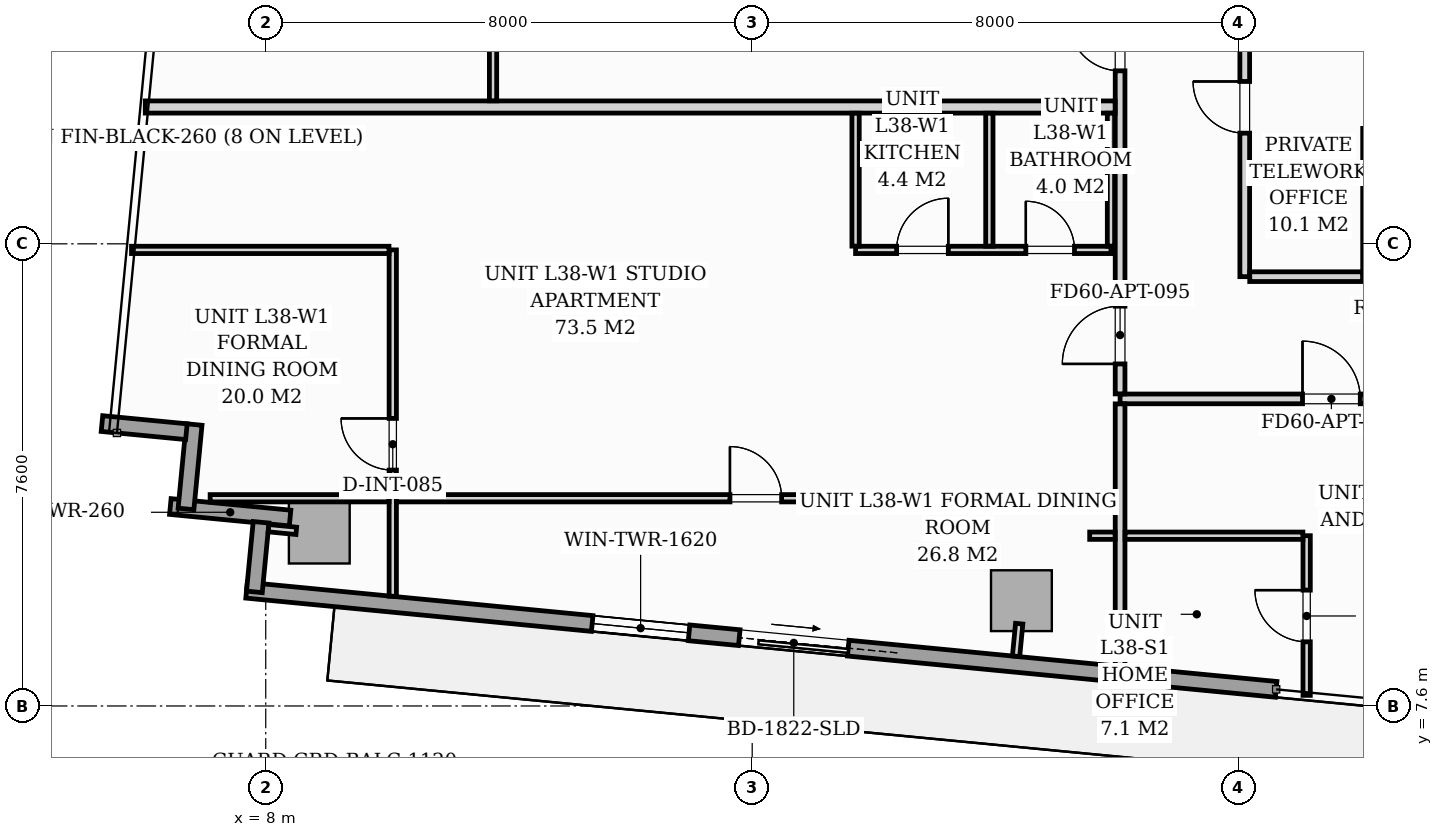
"""IFC4 building model, lengths in metres.
Left out: names, types, materials, properties, quantities, classifications, styles, units other than length and angle.
Written with IfcOpenShell. Run it as: python <this file> out.ifc"""

import sys

from ifc_helpers import new_model, si_unit, direction, frame, frame_2d, origin, origin_2d, place, context, subcontext, project, spatial, rectangle, extrude, source, transform, mapped, element, fill, save


model = new_model("IFC4")
c1 = context("Model", 3, precision=1e-05, world=origin(), true_north=direction((0.0, 1.0)))
c2 = subcontext(c1, "Body", "Model", "MODEL_VIEW")
j1 = project(units=[si_unit("LENGTHUNIT", "METRE"), si_unit("PLANEANGLEUNIT", "RADIAN")], contexts=[c1])
p1 = place(None, origin())
s1 = spatial("IfcSite", under=j1, at=p1, CompositionType="ELEMENT")
p2 = place(p1, origin())
s2 = spatial("IfcBuilding", under=s1, at=p2, CompositionType="ELEMENT")
p3 = place(p2, frame((0.0, 0.0, 134.2)))
s3 = spatial("IfcBuildingStorey", under=s2, at=p3, CompositionType="ELEMENT", Elevation=134.2)
m1 = source(origin(), c2, "Body", "SweptSolid", [
    extrude(rectangle(XDim=1.0, YDim=1.0, at=origin_2d()), origin(), (0.0, 0.0, 1.0), 3.196),
])
for number, where, z_axis, x_axis in (
    (1, (8.881, 10.443, 0.002), (0.0, 0.0, 1.0), (0.995, -0.096, 0.0)),
    (2, (20.427, 9.332, 0.002), (0.0, 0.0, 1.0), (0.995, -0.096, 0.0)),
):
    element("IfcColumn", number, at=place(p3, frame(where, z_axis=z_axis, x_axis=x_axis)), inside=s3, PredefinedType="COLUMN", context=c2, shape_type="MappedRepresentation", body=[
        mapped(m1, transform((0.0, 0.0, 0.0), scale=1.0)),
    ])
p4 = place(p3, frame((8.4, 10.69, 0.0), z_axis=(0.0, 0.0, 1.0), x_axis=(-0.995391147587, 0.095898192396, 0.0)))
e3 = element("IfcWall", 3, at=p4, inside=s3, PredefinedType="STANDARD", context=c2, shape_type="SweptSolid", body=[
    extrude(rectangle(XDim=1.978, YDim=0.26, at=frame_2d((0.989, 0.0))), origin(), (0.0, 0.0, 1.0), 2.94),
])
p5 = place(p3, frame((6.688, 10.84, 0.0), z_axis=(0.0, 0.0, 1.0), x_axis=(0.09589913835, 0.995391056452, 0.0)))
e4 = element("IfcWall", 4, at=p5, inside=s3, PredefinedType="STANDARD", context=c2, shape_type="SweptSolid", body=[
    extrude(rectangle(XDim=1.395, YDim=0.26, at=frame_2d((0.698, 0.0))), origin(), (0.0, 0.0, 1.0), 2.94),
])
p6 = place(p3, frame((6.695, 12.111, 0.0), z_axis=(0.0, 0.0, 1.0), x_axis=(-0.99540614245, 0.095742423056, 0.0)))
e5 = element("IfcWall", 5, at=p6, inside=s3, PredefinedType="STANDARD", context=c2, shape_type="SweptSolid", body=[
    extrude(rectangle(XDim=1.395, YDim=0.26, at=frame_2d((0.697, 0.0))), origin(), (0.0, 0.0, 1.0), 2.94),
])
p7 = place(p3, frame((24.617, 7.873, 0.0), z_axis=(0.0, 0.0, 1.0), x_axis=(-0.995395976631, 0.095848055311, 0.0)))
e6 = element("IfcWall", 6, at=p7, inside=s3, PredefinedType="STANDARD", context=c2, shape_type="SweptSolid", body=[
    extrude(rectangle(XDim=17.01, YDim=0.26, at=frame_2d((8.505, 0.0))), origin(), (0.0, 0.0, 1.0), 2.94),
])
p8 = place(p7, frame((7.07, 0.0, 0.0)))
e7 = element("IfcOpeningElement", 7, at=p8, cuts=e6, PredefinedType="OPENING", context=c2, shape_type="SweptSolid", body=[
    extrude(rectangle(XDim=1.8, YDim=2.06, at=frame_2d((0.9, 1.03))), frame((0.0, 0.14, 0.0), z_axis=(0.0, -1.0, 0.0), x_axis=(1.0, 0.0, 0.0)), (0.0, 0.0, 1.0), 0.28),
])
p9 = place(p7, frame((9.7, 0.0, 0.65)))
e8 = element("IfcOpeningElement", 8, at=p9, cuts=e6, PredefinedType="OPENING", context=c2, shape_type="SweptSolid", body=[
    extrude(rectangle(XDim=1.6, YDim=1.5, at=frame_2d((0.8, 0.75))), frame((0.0, 0.14, 0.0), z_axis=(0.0, -1.0, 0.0), x_axis=(1.0, 0.0, 0.0)), (0.0, 0.0, 1.0), 0.28),
])
p10 = place(p3, frame((7.813, 9.476, 0.0), z_axis=(0.0, 0.0, 1.0), x_axis=(0.09576095695, 0.995404359607, 0.0)))
e9 = element("IfcWall", 9, at=p10, inside=s3, PredefinedType="STANDARD", context=c2, shape_type="SweptSolid", body=[
    extrude(rectangle(XDim=1.15, YDim=0.26, at=frame_2d((0.575, 0.0))), origin(), (0.0, 0.0, 1.0), 2.94),
])
p11 = place(p3, frame((22.05, 12.65, 0.0), z_axis=(0.0, 0.0, 1.0), x_axis=(1.0, 0.0, 0.0)))
e10 = element("IfcWall", 10, at=p11, inside=s3, PredefinedType="PARTITIONING", context=c2, shape_type="SweptSolid", body=[
    extrude(rectangle(XDim=23.83, YDim=0.16, at=frame_2d((11.915, 0.0))), origin(), (0.0, 0.0, 1.0), 2.94),
])
p12 = place(p11, frame((3.0, 0.0, 0.0)))
e11 = element("IfcOpeningElement", 11, at=p12, cuts=e10, PredefinedType="OPENING", context=c2, shape_type="SweptSolid", body=[
    extrude(rectangle(XDim=0.95, YDim=2.06, at=frame_2d((0.475, 1.03))), frame((0.0, 0.09, 0.0), z_axis=(0.0, -1.0, 0.0), x_axis=(1.0, 0.0, 0.0)), (0.0, 0.0, 1.0), 0.18),
])
p13 = place(p11, frame((15.485, 0.0, 0.0)))
e12 = element("IfcOpeningElement", 12, at=p13, cuts=e10, PredefinedType="OPENING", context=c2, shape_type="SweptSolid", body=[
    extrude(rectangle(XDim=0.95, YDim=2.06, at=frame_2d((0.475, 1.03))), frame((0.0, 0.09, 0.0), z_axis=(0.0, -1.0, 0.0), x_axis=(1.0, 0.0, 0.0)), (0.0, 0.0, 1.0), 0.18),
])
p14 = place(p3, frame((22.05, 8.253, 0.0), z_axis=(0.0, 0.0, 1.0), x_axis=(0.0, 1.0, 0.0)))
e13 = element("IfcWall", 13, at=p14, inside=s3, PredefinedType="PARTITIONING", context=c2, shape_type="SweptSolid", body=[
    extrude(rectangle(XDim=4.315, YDim=0.16, at=frame_2d((2.157, 0.0))), origin(), (0.0, 0.0, 1.0), 2.94),
])
p15 = place(p3, frame((22.05, 12.732, 0.0), z_axis=(0.0, 0.0, 1.0), x_axis=(0.0, 1.0, 0.0)))
e14 = element("IfcWall", 14, at=p15, inside=s3, PredefinedType="PARTITIONING", context=c2, shape_type="SweptSolid", body=[
    extrude(rectangle(XDim=14.685, YDim=0.16, at=frame_2d((7.343, 0.0))), origin(), (0.0, 0.0, 1.0), 2.94),
])
p16 = place(p15, frame((0.493, 0.0, 0.0)))
e15 = element("IfcOpeningElement", 15, at=p16, cuts=e14, PredefinedType="OPENING", context=c2, shape_type="SweptSolid", body=[
    extrude(rectangle(XDim=0.95, YDim=2.06, at=frame_2d((0.475, 1.03))), frame((0.0, 0.09, 0.0), z_axis=(0.0, -1.0, 0.0), x_axis=(1.0, 0.0, 0.0)), (0.0, 0.0, 1.0), 0.18),
])
p17 = place(p15, frame((5.313, 0.0, 0.0)))
e16 = element("IfcOpeningElement", 16, at=p17, cuts=e14, PredefinedType="OPENING", context=c2, shape_type="SweptSolid", body=[
    extrude(rectangle(XDim=0.85, YDim=2.0, at=frame_2d((0.425, 1.0))), frame((0.0, 0.09, 0.0), z_axis=(0.0, -1.0, 0.0), x_axis=(1.0, 0.0, 0.0)), (0.0, 0.0, 1.0), 0.18),
])
p18 = place(p3, frame((25.118, 7.775, 0.0), z_axis=(0.0, 0.0, 1.0), x_axis=(0.0, 1.0, 0.0)))
e17 = element("IfcWall", 17, at=p18, inside=s3, PredefinedType="PARTITIONING", context=c2, shape_type="SweptSolid", body=[
    extrude(rectangle(XDim=2.625, YDim=0.12, at=frame_2d((1.312, 0.0))), origin(), (0.0, 0.0, 1.0), 2.94),
])
p19 = place(p18, frame((0.88, 0.0, 0.0)))
e18 = element("IfcOpeningElement", 18, at=p19, cuts=e17, PredefinedType="OPENING", context=c2, shape_type="SweptSolid", body=[
    extrude(rectangle(XDim=0.85, YDim=2.05, at=frame_2d((0.425, 1.025))), frame((0.0, 0.07, 0.0), z_axis=(0.0, -1.0, 0.0), x_axis=(1.0, 0.0, 0.0)), (0.0, 0.0, 1.0), 0.14),
])
p20 = place(p3, frame((21.55, 10.4, 0.0), z_axis=(0.0, 0.0, 1.0), x_axis=(1.0, 0.0, 0.0)))
e19 = element("IfcWall", 19, at=p20, inside=s3, PredefinedType="PARTITIONING", context=c2, shape_type="SweptSolid", body=[
    extrude(rectangle(XDim=0.418, YDim=0.12, at=frame_2d((0.209, 0.0))), origin(), (0.0, 0.0, 1.0), 2.94),
])
p21 = place(p3, frame((22.132, 10.4, 0.0), z_axis=(0.0, 0.0, 1.0), x_axis=(1.0, 0.0, 0.0)))
e20 = element("IfcWall", 20, at=p21, inside=s3, PredefinedType="PARTITIONING", context=c2, shape_type="SweptSolid", body=[
    extrude(rectangle(XDim=2.924, YDim=0.12, at=frame_2d((1.462, 0.0))), origin(), (0.0, 0.0, 1.0), 2.94),
])
p22 = place(p3, frame((6.019, 17.45, 0.0), z_axis=(0.0, 0.0, 1.0), x_axis=(1.0, 0.0, 0.0)))
e21 = element("IfcWall", 21, at=p22, inside=s3, PredefinedType="PARTITIONING", context=c2, shape_type="SweptSolid", body=[
    extrude(rectangle(XDim=15.949, YDim=0.2, at=frame_2d((7.975, 0.0))), origin(), (0.0, 0.0, 1.0), 2.94),
])
p23 = place(p3, frame((17.7, 15.1, 0.0), z_axis=(0.0, 0.0, 1.0), x_axis=(1.0, 0.0, 0.0)))
e22 = element("IfcWall", 22, at=p23, inside=s3, PredefinedType="PARTITIONING", context=c2, shape_type="SweptSolid", body=[
    extrude(rectangle(XDim=4.2, YDim=0.12, at=frame_2d((2.1, 0.0))), origin(), (0.0, 0.0, 1.0), 2.94),
])
p24 = place(p23, frame((0.675, 0.0, 0.0)))
e23 = element("IfcOpeningElement", 23, at=p24, cuts=e22, PredefinedType="OPENING", context=c2, shape_type="SweptSolid", body=[
    extrude(rectangle(XDim=0.85, YDim=2.05, at=frame_2d((0.425, 1.025))), frame((0.0, 0.07, 0.0), z_axis=(0.0, -1.0, 0.0), x_axis=(1.0, 0.0, 0.0)), (0.0, 0.0, 1.0), 0.14),
])
p25 = place(p23, frame((2.8, 0.0, 0.0)))
e24 = element("IfcOpeningElement", 24, at=p25, cuts=e22, PredefinedType="OPENING", context=c2, shape_type="SweptSolid", body=[
    extrude(rectangle(XDim=0.8, YDim=2.02, at=frame_2d((0.4, 1.01))), frame((0.0, 0.07, 0.0), z_axis=(0.0, -1.0, 0.0), x_axis=(1.0, 0.0, 0.0)), (0.0, 0.0, 1.0), 0.14),
])
for number, where, z_axis, x_axis in (
    (25, (17.7, 15.162, 0.0), (0.0, 0.0, 1.0), (0.0, 1.0, 0.0)),
    (26, (19.9, 15.162, 0.0), (0.0, 0.0, 1.0), (0.0, 1.0, 0.0)),
    (27, (21.9, 15.162, 0.0), (0.0, 0.0, 1.0), (0.0, 1.0, 0.0)),
):
    element("IfcWall", number, at=place(p3, frame(where, z_axis=z_axis, x_axis=x_axis)), inside=s3, PredefinedType="PARTITIONING", context=c2, shape_type="SweptSolid", body=[
        extrude(rectangle(XDim=2.186, YDim=0.12, at=frame_2d((1.093, 0.0))), origin(), (0.0, 0.0, 1.0), 2.94),
    ])
p26 = place(p3, frame((10.089, 9.405, 0.0), z_axis=(0.0, 0.0, 1.0), x_axis=(0.0, 1.0, 0.0)))
e28 = element("IfcWall", 28, at=p26, inside=s3, PredefinedType="PARTITIONING", context=c2, shape_type="SweptSolid", body=[
    extrude(rectangle(XDim=5.695, YDim=0.12, at=frame_2d((2.848, 0.0))), origin(), (0.0, 0.0, 1.0), 2.94),
])
p27 = place(p26, frame((2.074, 0.0, 0.0)))
e29 = element("IfcOpeningElement", 29, at=p27, cuts=e28, PredefinedType="OPENING", context=c2, shape_type="SweptSolid", body=[
    extrude(rectangle(XDim=0.85, YDim=2.05, at=frame_2d((0.425, 1.025))), frame((0.0, 0.07, 0.0), z_axis=(0.0, -1.0, 0.0), x_axis=(1.0, 0.0, 0.0)), (0.0, 0.0, 1.0), 0.14),
])
p28 = place(p3, frame((5.793, 15.1, 0.0), z_axis=(0.0, 0.0, 1.0), x_axis=(1.0, 0.0, 0.0)))
e30 = element("IfcWall", 30, at=p28, inside=s3, PredefinedType="PARTITIONING", context=c2, shape_type="SweptSolid", body=[
    extrude(rectangle(XDim=4.234, YDim=0.12, at=frame_2d((2.117, 0.0))), origin(), (0.0, 0.0, 1.0), 2.94),
])
p29 = place(p3, frame((7.086, 11.016, 0.0), z_axis=(0.0, 0.0, 1.0), x_axis=(1.0, 0.0, 0.0)))
e31 = element("IfcWall", 31, at=p29, inside=s3, PredefinedType="PARTITIONING", context=c2, shape_type="SweptSolid", body=[
    extrude(rectangle(XDim=2.941, YDim=0.12, at=frame_2d((1.471, 0.0))), origin(), (0.0, 0.0, 1.0), 2.94),
])
p30 = place(p3, frame((10.151, 11.016, 0.0), z_axis=(0.0, 0.0, 1.0), x_axis=(1.0, 0.0, 0.0)))
e32 = element("IfcWall", 32, at=p30, inside=s3, PredefinedType="PARTITIONING", context=c2, shape_type="SweptSolid", body=[
    extrude(rectangle(XDim=11.817, YDim=0.12, at=frame_2d((5.909, 0.0))), origin(), (0.0, 0.0, 1.0), 2.94),
])
p31 = place(p30, frame((5.483, 0.0, 0.0)))
e33 = element("IfcOpeningElement", 33, at=p31, cuts=e32, PredefinedType="OPENING", context=c2, shape_type="SweptSolid", body=[
    extrude(rectangle(XDim=0.85, YDim=2.05, at=frame_2d((0.425, 1.025))), frame((0.0, 0.07, 0.0), z_axis=(0.0, -1.0, 0.0), x_axis=(1.0, 0.0, 0.0)), (0.0, 0.0, 1.0), 0.14),
])
p32 = place(p3, frame((11.738, 17.552, 0.0), z_axis=(0.0, 0.0, 1.0), x_axis=(0.0, 1.0, 0.0)))
e34 = element("IfcWall", 34, at=p32, inside=s3, PredefinedType="PARTITIONING", context=c2, shape_type="SweptSolid", body=[
    extrude(rectangle(XDim=7.654, YDim=0.12, at=frame_2d((3.827, 0.0))), origin(), (0.0, 0.0, 1.0), 2.94),
])
p33 = place(p32, frame((3.402, 0.0, 0.0)))
e35 = element("IfcOpeningElement", 35, at=p33, cuts=e34, PredefinedType="OPENING", context=c2, shape_type="SweptSolid", body=[
    extrude(rectangle(XDim=0.85, YDim=2.05, at=frame_2d((0.425, 1.025))), frame((0.0, 0.07, 0.0), z_axis=(0.0, -1.0, 0.0), x_axis=(1.0, 0.0, 0.0)), (0.0, 0.0, 1.0), 0.14),
])
p34 = place(p3, frame((24.1, 14.66, 0.0), z_axis=(0.0, 0.0, 1.0), x_axis=(0.0, 1.0, 0.0)))
e36 = element("IfcWall", 36, at=p34, inside=s3, PredefinedType="PARTITIONING", context=c2, shape_type="SweptSolid", body=[
    extrude(rectangle(XDim=5.59, YDim=0.16, at=frame_2d((2.795, 0.0))), origin(), (0.0, 0.0, 1.0), 2.94),
])
p35 = place(p34, frame((2.36, 0.0, 0.0)))
e37 = element("IfcOpeningElement", 37, at=p35, cuts=e36, PredefinedType="OPENING", context=c2, shape_type="SweptSolid", body=[
    extrude(rectangle(XDim=0.85, YDim=2.0, at=frame_2d((0.425, 1.0))), frame((0.0, 0.09, 0.0), z_axis=(0.0, -1.0, 0.0), x_axis=(1.0, 0.0, 0.0)), (0.0, 0.0, 1.0), 0.18),
])
p36 = place(p3, frame((26.12, 14.66, 0.0), z_axis=(0.0, 0.0, 1.0), x_axis=(0.0, 1.0, 0.0)))
e38 = element("IfcWall", 38, at=p36, inside=s3, PredefinedType="PARTITIONING", context=c2, shape_type="SweptSolid", body=[
    extrude(rectangle(XDim=2.438, YDim=0.16, at=frame_2d((1.219, 0.0))), origin(), (0.0, 0.0, 1.0), 2.94),
])
p37 = place(p3, frame((24.182, 14.66, 0.0), z_axis=(0.0, 0.0, 1.0), x_axis=(1.0, 0.0, 0.0)))
e39 = element("IfcWall", 39, at=p37, inside=s3, PredefinedType="PARTITIONING", context=c2, shape_type="SweptSolid", body=[
    extrude(rectangle(XDim=1.856, YDim=0.16, at=frame_2d((0.928, 0.0))), origin(), (0.0, 0.0, 1.0), 2.94),
])
p38 = place(p3, frame((8.502, 10.48, 0.0), z_axis=(0.0, 0.0, 1.0), x_axis=(-0.995384576284, 0.09596637586, 0.0)))
e40 = element("IfcWall", 40, at=p38, inside=s3, PredefinedType="PARTITIONING", context=c2, shape_type="SweptSolid", body=[
    extrude(rectangle(XDim=0.458, YDim=0.12, at=frame_2d((0.229, 0.0))), origin(), (0.0, 0.0, 1.0), 2.94),
])
p39 = place(p3, frame((20.391, 8.953, 0.0), z_axis=(0.0, 0.0, 1.0), x_axis=(-0.096222656154, -0.995359834654, 0.0)))
e41 = element("IfcWall", 41, at=p39, inside=s3, PredefinedType="PARTITIONING", context=c2, shape_type="SweptSolid", body=[
    extrude(rectangle(XDim=0.538, YDim=0.12, at=frame_2d((0.269, 0.0))), origin(), (0.0, 0.0, 1.0), 2.94),
])
m2 = source(origin(), c2, "Body", "SweptSolid", [
    extrude(rectangle(XDim=1.8, YDim=2.06, at=frame_2d((0.9, 1.03))), frame((0.0, 0.025, 0.0), z_axis=(0.0, -1.0, 0.0), x_axis=(1.0, 0.0, 0.0)), (0.0, 0.0, 1.0), 0.05),
])
p40 = place(p8, origin())
e42 = element("IfcDoor", 42, at=p40, inside=s3, OperationType="SLIDING_TO_LEFT", PredefinedType="DOOR", context=c2, shape_type="MappedRepresentation", body=[
    mapped(m2, transform((0.0, 0.0, 0.0), scale=1.0)),
])
fill(e7, e42)
m3 = source(origin(), c2, "Body", "SweptSolid", [
    extrude(rectangle(XDim=1.6, YDim=1.5, at=frame_2d((0.8, 0.75))), frame((0.0, 0.03, 0.0), z_axis=(0.0, -1.0, 0.0), x_axis=(1.0, 0.0, 0.0)), (0.0, 0.0, 1.0), 0.06),
])
p41 = place(p9, origin())
e43 = element("IfcWindow", 43, at=p41, inside=s3, PartitioningType="SINGLE_PANEL", PredefinedType="WINDOW", context=c2, shape_type="MappedRepresentation", body=[
    mapped(m3, transform((0.0, 0.0, 0.0), scale=1.0)),
])
fill(e8, e43)
m4 = source(origin(), c2, "Body", "SweptSolid", [
    extrude(rectangle(XDim=0.85, YDim=2.05, at=frame_2d((0.425, 1.025))), frame((0.0, 0.025, 0.0), z_axis=(0.0, -1.0, 0.0), x_axis=(1.0, 0.0, 0.0)), (0.0, 0.0, 1.0), 0.05),
])
p42 = place(p19, origin())
e44 = element("IfcDoor", 44, at=p42, inside=s3, OperationType="SINGLE_SWING_RIGHT", PredefinedType="DOOR", context=c2, shape_type="MappedRepresentation", body=[
    mapped(m4, transform((0.0, 0.0, 0.0), scale=1.0)),
])
fill(e18, e44)
m5 = source(origin(), c2, "Body", "SweptSolid", [
    extrude(rectangle(XDim=0.95, YDim=2.06, at=frame_2d((0.475, 1.03))), frame((0.0, 0.025, 0.0), z_axis=(0.0, -1.0, 0.0), x_axis=(1.0, 0.0, 0.0)), (0.0, 0.0, 1.0), 0.05),
])
p43 = place(p12, origin())
e45 = element("IfcDoor", 45, at=p43, inside=s3, OperationType="SINGLE_SWING_LEFT", PredefinedType="DOOR", context=c2, shape_type="MappedRepresentation", body=[
    mapped(m5, transform((0.0, 0.0, 0.0), scale=1.0)),
])
fill(e11, e45)
p44 = place(p16, origin())
e46 = element("IfcDoor", 46, at=p44, inside=s3, OperationType="SINGLE_SWING_LEFT", PredefinedType="DOOR", context=c2, shape_type="MappedRepresentation", body=[
    mapped(m5, transform((0.0, 0.0, 0.0), scale=1.0)),
])
fill(e15, e46)
p45 = place(p27, origin())
e47 = element("IfcDoor", 47, at=p45, inside=s3, OperationType="SINGLE_SWING_RIGHT", PredefinedType="DOOR", context=c2, shape_type="MappedRepresentation", body=[
    mapped(m4, transform((0.0, 0.0, 0.0), scale=1.0)),
])
fill(e29, e47)
p46 = place(p31, origin())
e48 = element("IfcDoor", 48, at=p46, inside=s3, OperationType="SINGLE_SWING_LEFT", PredefinedType="DOOR", context=c2, shape_type="MappedRepresentation", body=[
    mapped(m4, transform((0.0, 0.0, 0.0), scale=1.0)),
])
fill(e33, e48)
p47 = place(p24, origin())
e49 = element("IfcDoor", 49, at=p47, inside=s3, OperationType="SINGLE_SWING_RIGHT", PredefinedType="DOOR", context=c2, shape_type="MappedRepresentation", body=[
    mapped(m4, transform((0.0, 0.0, 0.0), scale=1.0)),
])
fill(e23, e49)
m6 = source(origin(), c2, "Body", "SweptSolid", [
    extrude(rectangle(XDim=0.8, YDim=2.02, at=frame_2d((0.4, 1.01))), frame((0.0, 0.025, 0.0), z_axis=(0.0, -1.0, 0.0), x_axis=(1.0, 0.0, 0.0)), (0.0, 0.0, 1.0), 0.05),
])
p48 = place(p25, origin())
e50 = element("IfcDoor", 50, at=p48, inside=s3, OperationType="SINGLE_SWING_LEFT", PredefinedType="DOOR", context=c2, shape_type="MappedRepresentation", body=[
    mapped(m6, transform((0.0, 0.0, 0.0), scale=1.0)),
])
fill(e24, e50)
m7 = source(origin(), c2, "Body", "SweptSolid", [
    extrude(rectangle(XDim=0.85, YDim=2.0, at=frame_2d((0.425, 1.0))), frame((0.0, 0.025, 0.0), z_axis=(0.0, -1.0, 0.0), x_axis=(1.0, 0.0, 0.0)), (0.0, 0.0, 1.0), 0.05),
])
p49 = place(p17, origin())
e51 = element("IfcDoor", 51, at=p49, inside=s3, OperationType="SINGLE_SWING_RIGHT", PredefinedType="DOOR", context=c2, shape_type="MappedRepresentation", body=[
    mapped(m7, transform((0.0, 0.0, 0.0), scale=1.0)),
])
fill(e16, e51)
p50 = place(p35, origin())
e52 = element("IfcDoor", 52, at=p50, inside=s3, OperationType="SINGLE_SWING_RIGHT", PredefinedType="DOOR", context=c2, shape_type="MappedRepresentation", body=[
    mapped(m7, transform((0.0, 0.0, 0.0), scale=1.0)),
])
fill(e37, e52)
save(model, sys.argv[1])
